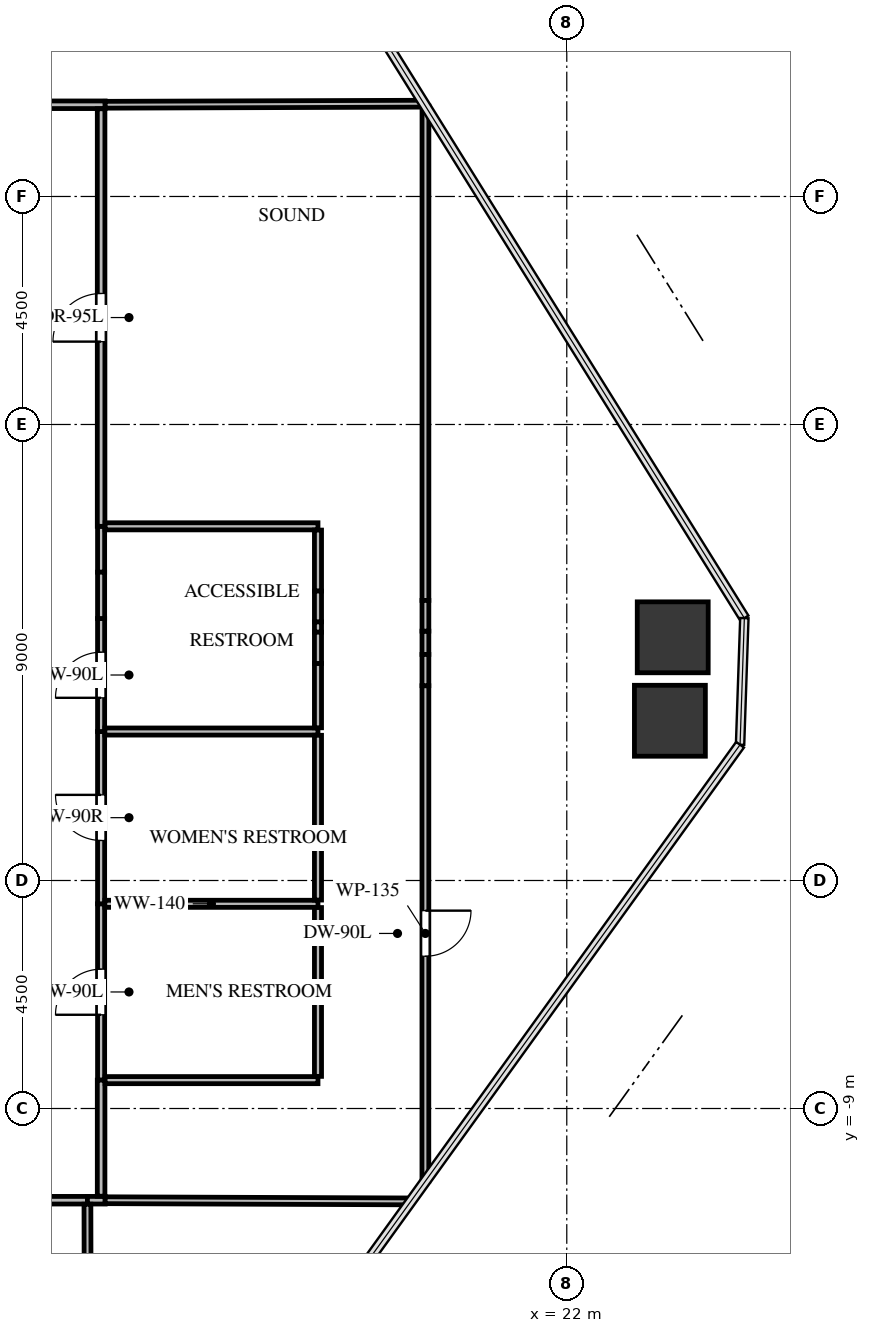
"""IFC4 building model, lengths in metres.
Left out: names, types, materials, properties, quantities, classifications, styles, units other than length and angle.
Written with IfcOpenShell. Run it as: python <this file> out.ifc"""

import sys

from ifc_helpers import new_model, si_unit, direction, frame, frame_2d, origin, origin_2d, place, context, subcontext, project, spatial, rectangle, extrude, source, transform, mapped, element, fill, save


model = new_model("IFC4")
c1 = context("Model", 3, precision=1e-05, world=origin(), true_north=direction((0.0, 1.0)))
c2 = subcontext(c1, "Body", "Model", "MODEL_VIEW")
j1 = project(units=[si_unit("LENGTHUNIT", "METRE"), si_unit("PLANEANGLEUNIT", "RADIAN")], contexts=[c1])
p1 = place(None, origin())
s1 = spatial("IfcSite", under=j1, at=p1, CompositionType="ELEMENT")
p2 = place(p1, origin())
s2 = spatial("IfcBuilding", under=s1, at=p2, CompositionType="ELEMENT")
p3 = place(p2, frame((0.0, 0.0, 58.8)))
s3 = spatial("IfcBuildingStorey", under=s2, at=p3, CompositionType="ELEMENT", Elevation=58.8)
m1 = source(origin(), c2, "Body", "SweptSolid", [
    extrude(rectangle(XDim=1.4, YDim=1.4, at=origin_2d()), origin(), (0.0, 0.0, 1.0), 3.3),
])
for number, where, z_axis, x_axis in (
    (1, (24.091, 0.3, -0.24), (0.0, 0.0, 1.0), (1.0, 0.0, 0.0)),
    (2, (24.035, -1.347, -0.24), (0.0, 0.0, 1.0), (1.0, 0.0, 0.0)),
):
    element("IfcColumn", number, at=place(p3, frame(where, z_axis=z_axis, x_axis=x_axis)), inside=s3, PredefinedType="COLUMN", context=c2, shape_type="MappedRepresentation", body=[
        mapped(m1, transform((0.0, 0.0, 0.0), x_axis=(1.0, 0.0, 0.0), y_axis=(0.0, 1.0, 0.0), z_axis=(0.0, 0.0, 1.0), scale=1.0)),
    ])
p4 = place(p3, frame((12.81, -8.44, 0.0), z_axis=(0.0, 0.0, 1.0), x_axis=(0.0, 1.0, 0.0)))
e3 = element("IfcWall", 3, at=p4, inside=s3, PredefinedType="PARTITIONING", context=c2, shape_type="SweptSolid", body=[
    extrude(rectangle(XDim=3.48, YDim=0.14, at=frame_2d((1.74, 0.0))), origin(), (0.0, 0.0, 1.0), 3.045),
])
p5 = place(p4, frame((1.29, 0.0, 0.0)))
e4 = element("IfcOpeningElement", 4, at=p5, cuts=e3, PredefinedType="OPENING", context=c2, shape_type="SweptSolid", body=[
    extrude(rectangle(XDim=0.9, YDim=2.05, at=frame_2d((0.45, 1.025))), frame((0.0, 0.08, 0.0), z_axis=(0.0, -1.0, 0.0), x_axis=(1.0, 0.0, 0.0)), (0.0, 0.0, 1.0), 0.16),
])
p6 = place(p3, frame((12.81, -4.96, 0.0), z_axis=(0.0, 0.0, 1.0), x_axis=(0.0, 1.0, 0.0)))
e5 = element("IfcWall", 5, at=p6, inside=s3, PredefinedType="PARTITIONING", context=c2, shape_type="SweptSolid", body=[
    extrude(rectangle(XDim=3.4, YDim=0.14, at=frame_2d((1.7, 0.0))), origin(), (0.0, 0.0, 1.0), 3.045),
])
p7 = place(p6, frame((1.25, 0.0, 0.0)))
e6 = element("IfcOpeningElement", 6, at=p7, cuts=e5, PredefinedType="OPENING", context=c2, shape_type="SweptSolid", body=[
    extrude(rectangle(XDim=0.9, YDim=2.05, at=frame_2d((0.45, 1.025))), frame((0.0, 0.08, 0.0), z_axis=(0.0, -1.0, 0.0), x_axis=(1.0, 0.0, 0.0)), (0.0, 0.0, 1.0), 0.16),
])
p8 = place(p3, frame((12.81, -1.56, 0.0), z_axis=(0.0, 0.0, 1.0), x_axis=(0.0, 1.0, 0.0)))
e7 = element("IfcWall", 7, at=p8, inside=s3, PredefinedType="PARTITIONING", context=c2, shape_type="SweptSolid", body=[
    extrude(rectangle(XDim=2.231, YDim=0.14, at=frame_2d((1.116, 0.0))), origin(), (0.0, 0.0, 1.0), 3.045),
])
p9 = place(p8, frame((0.666, 0.0, 0.0)))
e8 = element("IfcOpeningElement", 8, at=p9, cuts=e7, PredefinedType="OPENING", context=c2, shape_type="SweptSolid", body=[
    extrude(rectangle(XDim=0.9, YDim=2.05, at=frame_2d((0.45, 1.025))), frame((0.0, 0.08, 0.0), z_axis=(0.0, -1.0, 0.0), x_axis=(1.0, 0.0, 0.0)), (0.0, 0.0, 1.0), 0.16),
])
p10 = place(p3, frame((12.81, 1.585, 0.0), z_axis=(0.0, 0.0, 1.0), x_axis=(0.0, 1.0, 0.0)))
e9 = element("IfcWall", 9, at=p10, inside=s3, PredefinedType="PARTITIONING", context=c2, shape_type="SweptSolid", body=[
    extrude(rectangle(XDim=0.905, YDim=0.14, at=frame_2d((0.453, 0.0))), origin(), (0.0, 0.0, 1.0), 3.045),
])
p11 = place(p3, frame((12.81, 0.671, 0.0), z_axis=(0.0, 0.0, 1.0), x_axis=(0.0, 1.0, 0.0)))
e10 = element("IfcWall", 10, at=p11, inside=s3, PredefinedType="PARTITIONING", context=c2, shape_type="SweptSolid", body=[
    extrude(rectangle(XDim=0.914, YDim=0.14, at=frame_2d((0.457, 0.0))), origin(), (0.0, 0.0, 1.0), 2.13),
])
p12 = place(p3, frame((12.89, 10.81, 0.0), z_axis=(0.0, 0.0, 1.0), x_axis=(-1.0, 0.0, 0.0)))
e11 = element("IfcWall", 11, at=p12, inside=s3, PredefinedType="PARTITIONING", context=c2, shape_type="SweptSolid", body=[
    extrude(rectangle(XDim=1.847, YDim=0.15, at=frame_2d((0.924, 0.0))), origin(), (0.0, 0.0, 1.0), 3.045),
])
p13 = place(p3, frame((5.817, -10.81, 0.0), z_axis=(0.0, 0.0, 1.0), x_axis=(1.0, 0.0, 0.0)))
e12 = element("IfcWall", 12, at=p13, inside=s3, PredefinedType="PARTITIONING", context=c2, shape_type="SweptSolid", body=[
    extrude(rectangle(XDim=6.723, YDim=0.15, at=frame_2d((3.361, 0.0))), origin(), (0.0, 0.0, 1.0), 2.13),
])
p14 = place(p13, frame((2.911, 0.0, 0.0)))
e13 = element("IfcOpeningElement", 13, at=p14, cuts=e12, PredefinedType="OPENING", context=c2, shape_type="SweptSolid", body=[
    extrude(rectangle(XDim=0.9, YDim=2.05, at=frame_2d((0.45, 1.025))), frame((0.0, 0.085, 0.0), z_axis=(0.0, -1.0, 0.0), x_axis=(1.0, 0.0, 0.0)), (0.0, 0.0, 1.0), 0.17),
])
p15 = place(p3, frame((12.54, -10.81, 0.0), z_axis=(0.0, 0.0, 1.0), x_axis=(1.0, 0.0, 0.0)))
e14 = element("IfcWall", 14, at=p15, inside=s3, PredefinedType="PARTITIONING", context=c2, shape_type="SweptSolid", body=[
    extrude(rectangle(XDim=0.35, YDim=0.15, at=frame_2d((0.175, 0.0))), origin(), (0.0, 0.0, 1.0), 3.045),
])
p16 = place(p3, frame((12.81, 2.49, 0.0), z_axis=(0.0, 0.0, 1.0), x_axis=(0.0, 1.0, 0.0)))
e15 = element("IfcWall", 15, at=p16, inside=s3, PredefinedType="PARTITIONING", context=c2, shape_type="SweptSolid", body=[
    extrude(rectangle(XDim=8.241, YDim=0.15, at=frame_2d((4.121, 0.0))), origin(), (0.0, 0.0, 1.0), 3.045),
])
p17 = place(p16, frame((3.646, 0.0, 0.0)))
e16 = element("IfcOpeningElement", 16, at=p17, cuts=e15, PredefinedType="OPENING", context=c2, shape_type="SweptSolid", body=[
    extrude(rectangle(XDim=0.95, YDim=2.1, at=frame_2d((0.475, 1.05))), frame((0.0, 0.085, 0.0), z_axis=(0.0, -1.0, 0.0), x_axis=(1.0, 0.0, 0.0)), (0.0, 0.0, 1.0), 0.17),
])
p18 = place(p3, frame((12.81, -10.731, 0.0), z_axis=(0.0, 0.0, 1.0), x_axis=(0.0, 1.0, 0.0)))
e17 = element("IfcWall", 17, at=p18, inside=s3, PredefinedType="PARTITIONING", context=c2, shape_type="SweptSolid", body=[
    extrude(rectangle(XDim=2.291, YDim=0.15, at=frame_2d((1.146, 0.0))), origin(), (0.0, 0.0, 1.0), 3.045),
])
p19 = place(p3, frame((12.884, -4.96, 0.0), z_axis=(0.0, 0.0, 1.0), x_axis=(1.0, 0.0, 0.0)))
e18 = element("IfcWall", 18, at=p19, inside=s3, PredefinedType="PARTITIONING", context=c2, shape_type="SweptSolid", body=[
    extrude(rectangle(XDim=4.206, YDim=0.14, at=frame_2d((2.103, 0.0))), origin(), (0.0, 0.0, 1.0), 3.045),
])
p20 = place(p3, frame((17.09, -8.44, 0.0), z_axis=(0.0, 0.0, 1.0), x_axis=(-1.0, 0.0, 0.0)))
e19 = element("IfcWall", 19, at=p20, inside=s3, PredefinedType="PARTITIONING", context=c2, shape_type="SweptSolid", body=[
    extrude(rectangle(XDim=4.201, YDim=0.14, at=frame_2d((2.101, 0.0))), origin(), (0.0, 0.0, 1.0), 3.045),
])
p21 = place(p3, frame((17.09, -5.034, 0.0), z_axis=(0.0, 0.0, 1.0), x_axis=(0.0, -1.0, 0.0)))
e20 = element("IfcWall", 20, at=p21, inside=s3, PredefinedType="PARTITIONING", context=c2, shape_type="SweptSolid", body=[
    extrude(rectangle(XDim=3.332, YDim=0.14, at=frame_2d((1.666, 0.0))), origin(), (0.0, 0.0, 1.0), 3.045),
])
p22 = place(p3, frame((12.884, -1.56, 0.0), z_axis=(0.0, 0.0, 1.0), x_axis=(1.0, 0.0, 0.0)))
e21 = element("IfcWall", 21, at=p22, inside=s3, PredefinedType="PARTITIONING", context=c2, shape_type="SweptSolid", body=[
    extrude(rectangle(XDim=4.206, YDim=0.14, at=frame_2d((2.103, 0.0))), origin(), (0.0, 0.0, 1.0), 3.045),
])
p23 = place(p3, frame((17.09, -1.634, 0.0), z_axis=(0.0, 0.0, 1.0), x_axis=(0.0, -1.0, 0.0)))
e22 = element("IfcWall", 22, at=p23, inside=s3, PredefinedType="PARTITIONING", context=c2, shape_type="SweptSolid", body=[
    extrude(rectangle(XDim=3.252, YDim=0.14, at=frame_2d((1.626, 0.0))), origin(), (0.0, 0.0, 1.0), 3.045),
])
p24 = place(p3, frame((12.889, 2.49, 0.0), z_axis=(0.0, 0.0, 1.0), x_axis=(1.0, 0.0, 0.0)))
e23 = element("IfcWall", 23, at=p24, inside=s3, PredefinedType="PARTITIONING", context=c2, shape_type="SweptSolid", body=[
    extrude(rectangle(XDim=4.201, YDim=0.14, at=frame_2d((2.101, 0.0))), origin(), (0.0, 0.0, 1.0), 3.045),
])
p25 = place(p3, frame((17.09, 2.416, 0.0), z_axis=(0.0, 0.0, 1.0), x_axis=(0.0, -1.0, 0.0)))
e24 = element("IfcWall", 24, at=p25, inside=s3, PredefinedType="PARTITIONING", context=c2, shape_type="SweptSolid", body=[
    extrude(rectangle(XDim=1.204, YDim=0.14, at=frame_2d((0.602, 0.0))), origin(), (0.0, 0.0, 1.0), 3.045),
])
p26 = place(p3, frame((17.09, 0.606, 0.0), z_axis=(0.0, 0.0, 1.0), x_axis=(0.0, -1.0, 0.0)))
e25 = element("IfcWall", 25, at=p26, inside=s3, PredefinedType="PARTITIONING", context=c2, shape_type="SweptSolid", body=[
    extrude(rectangle(XDim=0.205, YDim=0.14, at=frame_2d((0.103, 0.0))), origin(), (0.0, 0.0, 1.0), 3.045),
])
p27 = place(p3, frame((17.09, -0.216, 0.0), z_axis=(0.0, 0.0, 1.0), x_axis=(0.0, -1.0, 0.0)))
e26 = element("IfcWall", 26, at=p27, inside=s3, PredefinedType="PARTITIONING", context=c2, shape_type="SweptSolid", body=[
    extrude(rectangle(XDim=1.27, YDim=0.14, at=frame_2d((0.635, 0.0))), origin(), (0.0, 0.0, 1.0), 3.045),
])
p28 = place(p3, frame((17.09, 1.212, 0.0), z_axis=(0.0, 0.0, 1.0), x_axis=(0.0, -1.0, 0.0)))
e27 = element("IfcWall", 27, at=p28, inside=s3, PredefinedType="PARTITIONING", context=c2, shape_type="SweptSolid", body=[
    extrude(rectangle(XDim=0.606, YDim=0.14, at=frame_2d((0.303, 0.0))), origin(), (0.0, 0.0, 1.0), 2.13),
])
p29 = place(p3, frame((17.09, 0.401, 0.0), z_axis=(0.0, 0.0, 1.0), x_axis=(0.0, -1.0, 0.0)))
e28 = element("IfcWall", 28, at=p29, inside=s3, PredefinedType="PARTITIONING", context=c2, shape_type="SweptSolid", body=[
    extrude(rectangle(XDim=0.617, YDim=0.14, at=frame_2d((0.309, 0.0))), origin(), (0.0, 0.0, 1.0), 2.13),
])
p30 = place(p3, frame((19.182, 10.831, 0.0), z_axis=(0.0, 0.0, 1.0), x_axis=(-0.999994432845, -0.003336806783, 0.0)))
e29 = element("IfcWall", 29, at=p30, inside=s3, PredefinedType="PARTITIONING", context=c2, shape_type="SweptSolid", body=[
    extrude(rectangle(XDim=6.292, YDim=0.135, at=frame_2d((3.146, 0.0))), origin(), (0.0, 0.0, 1.0), 2.38),
])
p31 = place(p3, frame((12.54, -10.889, 0.0), z_axis=(0.0, 0.0, 1.0), x_axis=(0.002115348101, -0.999997762649, 0.0)))
e30 = element("IfcWall", 30, at=p31, inside=s3, PredefinedType="PARTITIONING", context=c2, shape_type="SweptSolid", body=[
    extrude(rectangle(XDim=7.386, YDim=0.135, at=frame_2d((3.693, 0.0))), origin(), (0.0, 0.0, 1.0), 2.38),
])
p32 = place(p31, frame((3.243, 0.0, 0.0)))
e31 = element("IfcOpeningElement", 31, at=p32, cuts=e30, PredefinedType="OPENING", context=c2, shape_type="SweptSolid", body=[
    extrude(rectangle(XDim=0.9, YDim=2.05, at=frame_2d((0.45, 1.025))), frame((0.0, 0.078, 0.0), z_axis=(0.0, -1.0, 0.0), x_axis=(1.0, 0.0, 0.0)), (0.0, 0.0, 1.0), 0.155),
])
p33 = place(p3, frame((12.89, -10.81, 0.0), z_axis=(0.0, 0.0, 1.0), x_axis=(0.999992607823, -0.003845035728, 0.0)))
e32 = element("IfcWall", 32, at=p33, inside=s3, PredefinedType="PARTITIONING", context=c2, shape_type="SweptSolid", body=[
    extrude(rectangle(XDim=6.032, YDim=0.135, at=frame_2d((3.016, 0.0))), origin(), (0.0, 0.0, 1.0), 2.38),
])
p34 = place(p3, frame((19.211, 10.785, 0.0), z_axis=(0.0, 0.0, 1.0), x_axis=(-7.5063804e-05, -0.999999997183, 0.0)))
e33 = element("IfcWall", 33, at=p34, inside=s3, PredefinedType="PARTITIONING", context=c2, shape_type="SweptSolid", body=[
    extrude(rectangle(XDim=9.757, YDim=0.135, at=frame_2d((4.879, 0.0))), origin(), (0.0, 0.0, 1.0), 2.38),
])
p35 = place(p3, frame((19.21, 0.421, 0.0), z_axis=(0.0, 0.0, 1.0), x_axis=(0.0, -1.0, 0.0)))
e34 = element("IfcWall", 34, at=p35, inside=s3, PredefinedType="PARTITIONING", context=c2, shape_type="SweptSolid", body=[
    extrude(rectangle(XDim=0.46, YDim=0.135, at=frame_2d((0.23, 0.0))), origin(), (0.0, 0.0, 1.0), 3.045),
])
p36 = place(p3, frame((19.21, -0.656, 0.0), z_axis=(0.0, 0.0, 1.0), x_axis=(-7.4898886e-05, -0.999999997195, 0.0)))
e35 = element("IfcWall", 35, at=p36, inside=s3, PredefinedType="PARTITIONING", context=c2, shape_type="SweptSolid", body=[
    extrude(rectangle(XDim=9.779, YDim=0.135, at=frame_2d((4.889, 0.0))), origin(), (0.0, 0.0, 1.0), 2.38),
])
p37 = place(p36, frame((4.439, 0.0, 0.0)))
e36 = element("IfcOpeningElement", 36, at=p37, cuts=e35, PredefinedType="OPENING", context=c2, shape_type="SweptSolid", body=[
    extrude(rectangle(XDim=0.9, YDim=2.05, at=frame_2d((0.45, 1.025))), frame((0.0, 0.078, 0.0), z_axis=(0.0, -1.0, 0.0), x_axis=(1.0, 0.0, 0.0)), (0.0, 0.0, 1.0), 0.155),
])
p38 = place(p3, frame((19.21, 1.028, 0.0), z_axis=(0.0, 0.0, 1.0), x_axis=(0.0, -1.0, 0.0)))
e37 = element("IfcWall", 37, at=p38, inside=s3, PredefinedType="PARTITIONING", context=c2, shape_type="SweptSolid", body=[
    extrude(rectangle(XDim=0.606, YDim=0.135, at=frame_2d((0.303, 0.0))), origin(), (0.0, 0.0, 1.0), 2.13),
])
p39 = place(p3, frame((19.21, -0.039, 0.0), z_axis=(0.0, 0.0, 1.0), x_axis=(0.0, -1.0, 0.0)))
e38 = element("IfcWall", 38, at=p39, inside=s3, PredefinedType="PARTITIONING", context=c2, shape_type="SweptSolid", body=[
    extrude(rectangle(XDim=0.617, YDim=0.135, at=frame_2d((0.308, 0.0))), origin(), (0.0, 0.0, 1.0), 2.13),
])
m2 = source(origin(), c2, "Body", "SweptSolid", [
    extrude(rectangle(XDim=0.9, YDim=2.05, at=frame_2d((0.45, 1.025))), frame((0.0, 0.025, 0.0), z_axis=(0.0, -1.0, 0.0), x_axis=(1.0, 0.0, 0.0)), (0.0, 0.0, 1.0), 0.05),
])
p40 = place(p5, origin())
e39 = element("IfcDoor", 39, at=p40, inside=s3, OperationType="SINGLE_SWING_LEFT", PredefinedType="DOOR", context=c2, shape_type="MappedRepresentation", body=[
    mapped(m2, transform((0.0, 0.0, 0.0), x_axis=(1.0, 0.0, 0.0), y_axis=(0.0, 1.0, 0.0), z_axis=(0.0, 0.0, 1.0), scale=1.0)),
])
fill(e4, e39)
m3 = source(origin(), c2, "Body", "SweptSolid", [
    extrude(rectangle(XDim=0.9, YDim=2.05, at=frame_2d((0.45, 1.025))), frame((0.0, 0.025, 0.0), z_axis=(0.0, -1.0, 0.0), x_axis=(1.0, 0.0, 0.0)), (0.0, 0.0, 1.0), 0.05),
])
p41 = place(p7, origin())
e40 = element("IfcDoor", 40, at=p41, inside=s3, OperationType="SINGLE_SWING_RIGHT", PredefinedType="DOOR", context=c2, shape_type="MappedRepresentation", body=[
    mapped(m3, transform((0.0, 0.0, 0.0), x_axis=(1.0, 0.0, 0.0), y_axis=(0.0, 1.0, 0.0), z_axis=(0.0, 0.0, 1.0), scale=1.0)),
])
fill(e6, e40)
p42 = place(p9, origin())
e41 = element("IfcDoor", 41, at=p42, inside=s3, OperationType="SINGLE_SWING_LEFT", PredefinedType="DOOR", context=c2, shape_type="MappedRepresentation", body=[
    mapped(m2, transform((0.0, 0.0, 0.0), x_axis=(1.0, 0.0, 0.0), y_axis=(0.0, 1.0, 0.0), z_axis=(0.0, 0.0, 1.0), scale=1.0)),
])
fill(e8, e41)
m4 = source(origin(), c2, "Body", "SweptSolid", [
    extrude(rectangle(XDim=0.95, YDim=2.1, at=frame_2d((0.475, 1.05))), frame((0.0, 0.025, 0.0), z_axis=(0.0, -1.0, 0.0), x_axis=(1.0, 0.0, 0.0)), (0.0, 0.0, 1.0), 0.05),
])
p43 = place(p17, origin())
e42 = element("IfcDoor", 42, at=p43, inside=s3, OperationType="SINGLE_SWING_LEFT", PredefinedType="DOOR", context=c2, shape_type="MappedRepresentation", body=[
    mapped(m4, transform((0.0, 0.0, 0.0), x_axis=(1.0, 0.0, 0.0), y_axis=(0.0, 1.0, 0.0), z_axis=(0.0, 0.0, 1.0), scale=1.0)),
])
fill(e16, e42)
p44 = place(p37, origin())
e43 = element("IfcDoor", 43, at=p44, inside=s3, OperationType="SINGLE_SWING_LEFT", PredefinedType="DOOR", context=c2, shape_type="MappedRepresentation", body=[
    mapped(m2, transform((0.0, 0.0, 0.0), x_axis=(1.0, 0.0, 0.0), y_axis=(0.0, 1.0, 0.0), z_axis=(0.0, 0.0, 1.0), scale=1.0)),
])
fill(e36, e43)
save(model, sys.argv[1])
